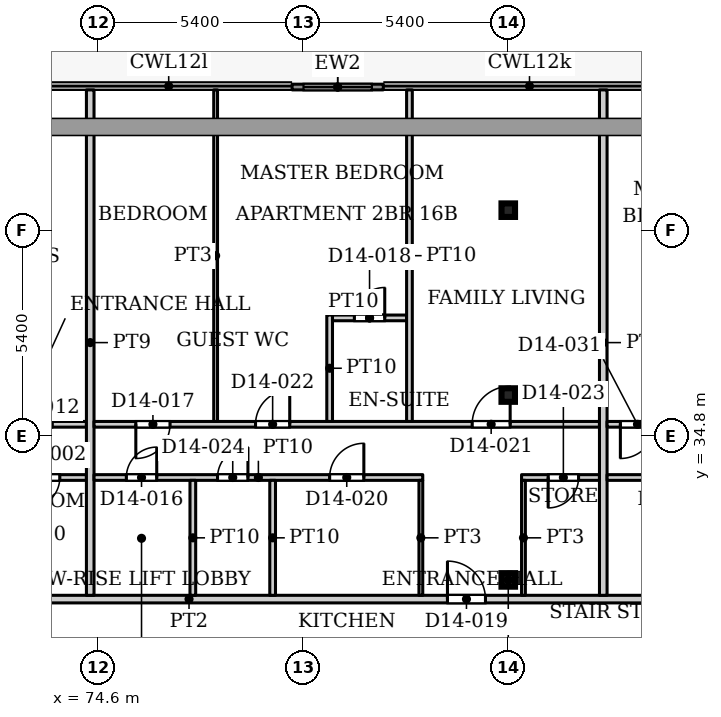
"""IFC4 building model, lengths in metres.
Left out: names, types, materials, properties, quantities, classifications, styles, units other than length and angle.
Written with IfcOpenShell. Run it as: python <this file> out.ifc"""

import sys

from ifc_helpers import new_model, si_unit, direction, frame, frame_2d, origin, origin_2d, place, context, subcontext, project, spatial, rectangle, hollow_rectangle, extrude, source, transform, mapped, element, fill, save


model = new_model("IFC4")
c1 = context("Model", 3, precision=1e-05, world=origin(), true_north=direction((0.0, 1.0)))
c2 = subcontext(c1, "Body", "Model", "MODEL_VIEW")
j1 = project(units=[si_unit("LENGTHUNIT", "METRE"), si_unit("PLANEANGLEUNIT", "RADIAN")], contexts=[c1])
p1 = place(None, origin())
s1 = spatial("IfcSite", under=j1, at=p1, CompositionType="ELEMENT")
p2 = place(p1, origin())
s2 = spatial("IfcBuilding", under=s1, at=p2, CompositionType="ELEMENT")
p3 = place(p2, frame((0.0, 0.0, 69.5)))
s3 = spatial("IfcBuildingStorey", under=s2, at=p3, CompositionType="ELEMENT", Elevation=69.5)
for number, where, z_axis, x_axis in (
    (1, (85.4, 31.005, 0.0), (0.0, 0.0, 1.0), (1.0, 0.0, 0.0)),
    (2, (85.4, 35.87, 0.0), (0.0, 0.0, 1.0), (1.0, 0.0, 0.0)),
    (3, (85.4, 40.735, 0.0), (0.0, 0.0, 1.0), (1.0, 0.0, 0.0)),
):
    element("IfcColumn", number, at=place(p3, frame(where, z_axis=z_axis, x_axis=x_axis)), inside=s3, PredefinedType="COLUMN", context=c2, shape_type="SweptSolid", body=[
        extrude(hollow_rectangle(XDim=0.356, YDim=0.356, WallThickness=0.016, InnerFilletRadius=0.016, OuterFilletRadius=0.032, at=origin_2d()), origin(), (0.0, 0.0, 1.0), 3.9),
    ])
p4 = place(p3, frame((79.712, 43.975, 0.0), z_axis=(0.0, 0.0, 1.0), x_axis=(1.0, 0.0, 0.0)))
e4 = element("IfcWall", 4, at=p4, inside=s3, PredefinedType="SOLIDWALL", context=c2, shape_type="SweptSolid", body=[
    extrude(rectangle(XDim=2.4, YDim=0.15, at=frame_2d((1.2, 0.0))), origin(), (0.0, 0.0, 1.0), 3.75),
])
p5 = place(p4, frame((0.3, 0.0, 0.0)))
e5 = element("IfcOpeningElement", 5, at=p5, cuts=e4, PredefinedType="OPENING", context=c2, shape_type="SweptSolid", body=[
    extrude(rectangle(XDim=1.8, YDim=2.4, at=frame_2d((0.9, 1.2))), frame((0.0, 0.085, 0.0), z_axis=(0.0, -1.0, 0.0), x_axis=(1.0, 0.0, 0.0)), (0.0, 0.0, 1.0), 0.17),
])
p6 = place(p3, frame((55.9, 30.5, 0.0), z_axis=(0.0, 0.0, 1.0), x_axis=(1.0, 0.0, 0.0)))
e6 = element("IfcWall", 6, at=p6, inside=s3, PredefinedType="PARTITIONING", context=c2, shape_type="SweptSolid", body=[
    extrude(rectangle(XDim=42.2, YDim=0.2, at=frame_2d((21.1, 0.0))), origin(), (0.0, 0.0, 1.0), 3.6),
])
p7 = place(p6, frame((14.7, 0.0, 0.0)))
e7 = element("IfcOpeningElement", 7, at=p7, cuts=e6, PredefinedType="OPENING", context=c2, shape_type="SweptSolid", body=[
    extrude(rectangle(XDim=1.0, YDim=2.1, at=frame_2d((0.5, 1.05))), frame((0.0, 0.11, 0.0), z_axis=(0.0, -1.0, 0.0), x_axis=(1.0, 0.0, 0.0)), (0.0, 0.0, 1.0), 0.22),
])
p8 = place(p6, frame((27.9, 0.0, 0.0)))
e8 = element("IfcOpeningElement", 8, at=p8, cuts=e6, PredefinedType="OPENING", context=c2, shape_type="SweptSolid", body=[
    extrude(rectangle(XDim=1.0, YDim=2.1, at=frame_2d((0.5, 1.05))), frame((0.0, 0.11, 0.0), z_axis=(0.0, -1.0, 0.0), x_axis=(1.0, 0.0, 0.0)), (0.0, 0.0, 1.0), 0.22),
])
p9 = place(p6, frame((39.0, 0.0, 0.0)))
e9 = element("IfcOpeningElement", 9, at=p9, cuts=e6, PredefinedType="OPENING", context=c2, shape_type="SweptSolid", body=[
    extrude(rectangle(XDim=1.0, YDim=2.1, at=frame_2d((0.5, 1.05))), frame((0.0, 0.11, 0.0), z_axis=(0.0, -1.0, 0.0), x_axis=(1.0, 0.0, 0.0)), (0.0, 0.0, 1.0), 0.22),
])
p10 = place(p3, frame((55.9, 35.1, 0.0), z_axis=(0.0, 0.0, 1.0), x_axis=(1.0, 0.0, 0.0)))
e10 = element("IfcWall", 10, at=p10, inside=s3, PredefinedType="PARTITIONING", context=c2, shape_type="SweptSolid", body=[
    extrude(rectangle(XDim=18.4, YDim=0.15, at=frame_2d((9.2, 0.0))), origin(), (0.0, 0.0, 1.0), 3.6),
])
p11 = place(p10, frame((1.25, 0.0, 0.0)))
e11 = element("IfcOpeningElement", 11, at=p11, cuts=e10, PredefinedType="OPENING", context=c2, shape_type="SweptSolid", body=[
    extrude(rectangle(XDim=0.9, YDim=2.1, at=frame_2d((0.45, 1.05))), frame((0.0, 0.085, 0.0), z_axis=(0.0, -1.0, 0.0), x_axis=(1.0, 0.0, 0.0)), (0.0, 0.0, 1.0), 0.17),
])
p12 = place(p10, frame((9.2, 0.0, 0.0)))
e12 = element("IfcOpeningElement", 12, at=p12, cuts=e10, PredefinedType="OPENING", context=c2, shape_type="SweptSolid", body=[
    extrude(rectangle(XDim=0.9, YDim=2.1, at=frame_2d((0.45, 1.05))), frame((0.0, 0.085, 0.0), z_axis=(0.0, -1.0, 0.0), x_axis=(1.0, 0.0, 0.0)), (0.0, 0.0, 1.0), 0.17),
])
p13 = place(p10, frame((12.35, 0.0, 0.0)))
e13 = element("IfcOpeningElement", 13, at=p13, cuts=e10, PredefinedType="OPENING", context=c2, shape_type="SweptSolid", body=[
    extrude(rectangle(XDim=1.0, YDim=2.1, at=frame_2d((0.5, 1.05))), frame((0.0, 0.085, 0.0), z_axis=(0.0, -1.0, 0.0), x_axis=(1.0, 0.0, 0.0)), (0.0, 0.0, 1.0), 0.17),
])
p14 = place(p10, frame((15.9, 0.0, 0.0)))
e14 = element("IfcOpeningElement", 14, at=p14, cuts=e10, PredefinedType="OPENING", context=c2, shape_type="SweptSolid", body=[
    extrude(rectangle(XDim=1.6, YDim=2.1, at=frame_2d((0.8, 1.05))), frame((0.0, 0.085, 0.0), z_axis=(0.0, -1.0, 0.0), x_axis=(1.0, 0.0, 0.0)), (0.0, 0.0, 1.0), 0.17),
])
p15 = place(p10, frame((4.4, 0.0, 0.0)))
e15 = element("IfcOpeningElement", 15, at=p15, cuts=e10, PredefinedType="OPENING", context=c2, shape_type="SweptSolid", body=[
    extrude(rectangle(XDim=0.9, YDim=2.1, at=frame_2d((0.45, 1.05))), frame((0.0, 0.085, 0.0), z_axis=(0.0, -1.0, 0.0), x_axis=(1.0, 0.0, 0.0)), (0.0, 0.0, 1.0), 0.17),
])
p16 = place(p3, frame((72.075, 33.7, 0.0), z_axis=(0.0, 0.0, 1.0), x_axis=(1.0, 0.0, 0.0)))
e16 = element("IfcWall", 16, at=p16, inside=s3, PredefinedType="PARTITIONING", context=c2, shape_type="SweptSolid", body=[
    extrude(rectangle(XDim=2.225, YDim=0.15, at=frame_2d((1.113, 0.0))), origin(), (0.0, 0.0, 1.0), 3.6),
])
p17 = place(p16, frame((0.725, 0.0, 0.0)))
e17 = element("IfcOpeningElement", 17, at=p17, cuts=e16, PredefinedType="OPENING", context=c2, shape_type="SweptSolid", body=[
    extrude(rectangle(XDim=0.8, YDim=2.1, at=frame_2d((0.4, 1.05))), frame((0.0, 0.085, 0.0), z_axis=(0.0, -1.0, 0.0), x_axis=(1.0, 0.0, 0.0)), (0.0, 0.0, 1.0), 0.17),
])
p18 = place(p3, frame((74.4, 30.6, 0.0), z_axis=(0.0, 0.0, 1.0), x_axis=(0.0, 1.0, 0.0)))
e18 = element("IfcWall", 18, at=p18, inside=s3, PredefinedType="PARTITIONING", context=c2, shape_type="SweptSolid", body=[
    extrude(rectangle(XDim=13.3, YDim=0.2, at=frame_2d((6.65, 0.0))), origin(), (0.0, 0.0, 1.0), 3.6),
])
p19 = place(p3, frame((74.5, 33.7, 0.0), z_axis=(0.0, 0.0, 1.0), x_axis=(1.0, 0.0, 0.0)))
e19 = element("IfcWall", 19, at=p19, inside=s3, PredefinedType="PARTITIONING", context=c2, shape_type="SweptSolid", body=[
    extrude(rectangle(XDim=8.65, YDim=0.15, at=frame_2d((4.325, 0.0))), origin(), (0.0, 0.0, 1.0), 3.6),
])
p20 = place(p19, frame((0.85, 0.0, 0.0)))
e20 = element("IfcOpeningElement", 20, at=p20, cuts=e19, PredefinedType="OPENING", context=c2, shape_type="SweptSolid", body=[
    extrude(rectangle(XDim=0.8, YDim=2.1, at=frame_2d((0.4, 1.05))), frame((0.0, 0.085, 0.0), z_axis=(0.0, -1.0, 0.0), x_axis=(1.0, 0.0, 0.0)), (0.0, 0.0, 1.0), 0.17),
])
p21 = place(p19, frame((6.2, 0.0, 0.0)))
e21 = element("IfcOpeningElement", 21, at=p21, cuts=e19, PredefinedType="OPENING", context=c2, shape_type="SweptSolid", body=[
    extrude(rectangle(XDim=0.9, YDim=2.1, at=frame_2d((0.45, 1.05))), frame((0.0, 0.085, 0.0), z_axis=(0.0, -1.0, 0.0), x_axis=(1.0, 0.0, 0.0)), (0.0, 0.0, 1.0), 0.17),
])
p22 = place(p19, frame((3.25, 0.0, 0.0)))
e22 = element("IfcOpeningElement", 22, at=p22, cuts=e19, PredefinedType="OPENING", context=c2, shape_type="SweptSolid", body=[
    extrude(rectangle(XDim=0.8, YDim=2.1, at=frame_2d((0.4, 1.05))), frame((0.0, 0.085, 0.0), z_axis=(0.0, -1.0, 0.0), x_axis=(1.0, 0.0, 0.0)), (0.0, 0.0, 1.0), 0.17),
])
p23 = place(p3, frame((74.5, 35.1, 0.0), z_axis=(0.0, 0.0, 1.0), x_axis=(1.0, 0.0, 0.0)))
e23 = element("IfcWall", 23, at=p23, inside=s3, PredefinedType="PARTITIONING", context=c2, shape_type="SweptSolid", body=[
    extrude(rectangle(XDim=13.3, YDim=0.15, at=frame_2d((6.65, 0.0))), origin(), (0.0, 0.0, 1.0), 3.6),
])
p24 = place(p23, frame((1.1, 0.0, 0.0)))
e24 = element("IfcOpeningElement", 24, at=p24, cuts=e23, PredefinedType="OPENING", context=c2, shape_type="SweptSolid", body=[
    extrude(rectangle(XDim=0.9, YDim=2.1, at=frame_2d((0.45, 1.05))), frame((0.0, 0.085, 0.0), z_axis=(0.0, -1.0, 0.0), x_axis=(1.0, 0.0, 0.0)), (0.0, 0.0, 1.0), 0.17),
])
p25 = place(p23, frame((9.95, 0.0, 0.0)))
e25 = element("IfcOpeningElement", 25, at=p25, cuts=e23, PredefinedType="OPENING", context=c2, shape_type="SweptSolid", body=[
    extrude(rectangle(XDim=1.0, YDim=2.1, at=frame_2d((0.5, 1.05))), frame((0.0, 0.085, 0.0), z_axis=(0.0, -1.0, 0.0), x_axis=(1.0, 0.0, 0.0)), (0.0, 0.0, 1.0), 0.17),
])
p26 = place(p23, frame((4.25, 0.0, 0.0)))
e26 = element("IfcOpeningElement", 26, at=p26, cuts=e23, PredefinedType="OPENING", context=c2, shape_type="SweptSolid", body=[
    extrude(rectangle(XDim=0.9, YDim=2.1, at=frame_2d((0.45, 1.05))), frame((0.0, 0.085, 0.0), z_axis=(0.0, -1.0, 0.0), x_axis=(1.0, 0.0, 0.0)), (0.0, 0.0, 1.0), 0.17),
])
p27 = place(p3, frame((77.1, 30.6, 0.0), z_axis=(0.0, 0.0, 1.0), x_axis=(0.0, 1.0, 0.0)))
e27 = element("IfcWall", 27, at=p27, inside=s3, PredefinedType="PARTITIONING", context=c2, shape_type="SweptSolid", body=[
    extrude(rectangle(XDim=3.025, YDim=0.15, at=frame_2d((1.512, 0.0))), origin(), (0.0, 0.0, 1.0), 3.6),
])
p28 = place(p3, frame((77.7, 35.175, 0.0), z_axis=(0.0, 0.0, 1.0), x_axis=(0.0, 1.0, 0.0)))
e28 = element("IfcWall", 28, at=p28, inside=s3, PredefinedType="PARTITIONING", context=c2, shape_type="SweptSolid", body=[
    extrude(rectangle(XDim=8.725, YDim=0.1, at=frame_2d((4.362, 0.0))), origin(), (0.0, 0.0, 1.0), 3.6),
])
p29 = place(p3, frame((79.2, 30.6, 0.0), z_axis=(0.0, 0.0, 1.0), x_axis=(0.0, 1.0, 0.0)))
e29 = element("IfcWall", 29, at=p29, inside=s3, PredefinedType="PARTITIONING", context=c2, shape_type="SweptSolid", body=[
    extrude(rectangle(XDim=3.025, YDim=0.15, at=frame_2d((1.512, 0.0))), origin(), (0.0, 0.0, 1.0), 3.6),
])
p30 = place(p3, frame((80.7, 35.175, 0.0), z_axis=(0.0, 0.0, 1.0), x_axis=(0.0, 1.0, 0.0)))
e30 = element("IfcWall", 30, at=p30, inside=s3, PredefinedType="PARTITIONING", context=c2, shape_type="SweptSolid", body=[
    extrude(rectangle(XDim=2.8, YDim=0.15, at=frame_2d((1.4, 0.0))), origin(), (0.0, 0.0, 1.0), 3.6),
])
p31 = place(p3, frame((80.775, 37.9, 0.0), z_axis=(0.0, 0.0, 1.0), x_axis=(1.0, 0.0, 0.0)))
e31 = element("IfcWall", 31, at=p31, inside=s3, PredefinedType="PARTITIONING", context=c2, shape_type="SweptSolid", body=[
    extrude(rectangle(XDim=1.95, YDim=0.15, at=frame_2d((0.975, 0.0))), origin(), (0.0, 0.0, 1.0), 3.6),
])
p32 = place(p31, frame((0.575, 0.0, 0.0)))
e32 = element("IfcOpeningElement", 32, at=p32, cuts=e31, PredefinedType="OPENING", context=c2, shape_type="SweptSolid", body=[
    extrude(rectangle(XDim=0.8, YDim=2.1, at=frame_2d((0.4, 1.05))), frame((0.0, 0.085, 0.0), z_axis=(0.0, -1.0, 0.0), x_axis=(1.0, 0.0, 0.0)), (0.0, 0.0, 1.0), 0.17),
])
p33 = place(p3, frame((82.8, 35.175, 0.0), z_axis=(0.0, 0.0, 1.0), x_axis=(0.0, 1.0, 0.0)))
e33 = element("IfcWall", 33, at=p33, inside=s3, PredefinedType="PARTITIONING", context=c2, shape_type="SweptSolid", body=[
    extrude(rectangle(XDim=8.725, YDim=0.15, at=frame_2d((4.362, 0.0))), origin(), (0.0, 0.0, 1.0), 3.6),
])
p34 = place(p3, frame((83.1, 30.6, 0.0), z_axis=(0.0, 0.0, 1.0), x_axis=(0.0, 1.0, 0.0)))
e34 = element("IfcWall", 34, at=p34, inside=s3, PredefinedType="PARTITIONING", context=c2, shape_type="SweptSolid", body=[
    extrude(rectangle(XDim=3.025, YDim=0.1, at=frame_2d((1.512, 0.0))), origin(), (0.0, 0.0, 1.0), 3.6),
])
p35 = place(p3, frame((85.75, 33.7, 0.0), z_axis=(0.0, 0.0, 1.0), x_axis=(1.0, 0.0, 0.0)))
e35 = element("IfcWall", 35, at=p35, inside=s3, PredefinedType="PARTITIONING", context=c2, shape_type="SweptSolid", body=[
    extrude(rectangle(XDim=2.05, YDim=0.15, at=frame_2d((1.025, 0.0))), origin(), (0.0, 0.0, 1.0), 3.6),
])
p36 = place(p35, frame((0.7, 0.0, 0.0)))
e36 = element("IfcOpeningElement", 36, at=p36, cuts=e35, PredefinedType="OPENING", context=c2, shape_type="SweptSolid", body=[
    extrude(rectangle(XDim=0.8, YDim=2.1, at=frame_2d((0.4, 1.05))), frame((0.0, 0.085, 0.0), z_axis=(0.0, -1.0, 0.0), x_axis=(1.0, 0.0, 0.0)), (0.0, 0.0, 1.0), 0.17),
])
p37 = place(p3, frame((85.8, 30.6, 0.0), z_axis=(0.0, 0.0, 1.0), x_axis=(0.0, 1.0, 0.0)))
e37 = element("IfcWall", 37, at=p37, inside=s3, PredefinedType="PARTITIONING", context=c2, shape_type="SweptSolid", body=[
    extrude(rectangle(XDim=3.025, YDim=0.1, at=frame_2d((1.512, 0.0))), origin(), (0.0, 0.0, 1.0), 3.6),
])
p38 = place(p3, frame((87.9, 30.6, 0.0), z_axis=(0.0, 0.0, 1.0), x_axis=(0.0, 1.0, 0.0)))
e38 = element("IfcWall", 38, at=p38, inside=s3, PredefinedType="PARTITIONING", context=c2, shape_type="SweptSolid", body=[
    extrude(rectangle(XDim=13.3, YDim=0.2, at=frame_2d((6.65, 0.0))), origin(), (0.0, 0.0, 1.0), 3.6),
])
p39 = place(p3, frame((88.0, 33.7, 0.0), z_axis=(0.0, 0.0, 1.0), x_axis=(1.0, 0.0, 0.0)))
e39 = element("IfcWall", 39, at=p39, inside=s3, PredefinedType="PARTITIONING", context=c2, shape_type="SweptSolid", body=[
    extrude(rectangle(XDim=6.275, YDim=0.15, at=frame_2d((3.137, 0.0))), origin(), (0.0, 0.0, 1.0), 3.6),
])
p40 = place(p39, frame((1.45, 0.0, 0.0)))
e40 = element("IfcOpeningElement", 40, at=p40, cuts=e39, PredefinedType="OPENING", context=c2, shape_type="SweptSolid", body=[
    extrude(rectangle(XDim=0.9, YDim=2.1, at=frame_2d((0.45, 1.05))), frame((0.0, 0.085, 0.0), z_axis=(0.0, -1.0, 0.0), x_axis=(1.0, 0.0, 0.0)), (0.0, 0.0, 1.0), 0.17),
])
p41 = place(p39, frame((4.75, 0.0, 0.0)))
e41 = element("IfcOpeningElement", 41, at=p41, cuts=e39, PredefinedType="OPENING", context=c2, shape_type="SweptSolid", body=[
    extrude(rectangle(XDim=0.8, YDim=2.1, at=frame_2d((0.4, 1.05))), frame((0.0, 0.085, 0.0), z_axis=(0.0, -1.0, 0.0), x_axis=(1.0, 0.0, 0.0)), (0.0, 0.0, 1.0), 0.17),
])
p42 = place(p3, frame((88.0, 35.1, 0.0), z_axis=(0.0, 0.0, 1.0), x_axis=(1.0, 0.0, 0.0)))
e42 = element("IfcWall", 42, at=p42, inside=s3, PredefinedType="PARTITIONING", context=c2, shape_type="SweptSolid", body=[
    extrude(rectangle(XDim=11.9, YDim=0.15, at=frame_2d((5.95, 0.0))), origin(), (0.0, 0.0, 1.0), 3.6),
])
p43 = place(p42, frame((9.65, 0.0, 0.0)))
e43 = element("IfcOpeningElement", 43, at=p43, cuts=e42, PredefinedType="OPENING", context=c2, shape_type="SweptSolid", body=[
    extrude(rectangle(XDim=0.9, YDim=2.1, at=frame_2d((0.45, 1.05))), frame((0.0, 0.085, 0.0), z_axis=(0.0, -1.0, 0.0), x_axis=(1.0, 0.0, 0.0)), (0.0, 0.0, 1.0), 0.17),
])
p44 = place(p42, frame((5.55, 0.0, 0.0)))
e44 = element("IfcOpeningElement", 44, at=p44, cuts=e42, PredefinedType="OPENING", context=c2, shape_type="SweptSolid", body=[
    extrude(rectangle(XDim=1.0, YDim=2.1, at=frame_2d((0.5, 1.05))), frame((0.0, 0.085, 0.0), z_axis=(0.0, -1.0, 0.0), x_axis=(1.0, 0.0, 0.0)), (0.0, 0.0, 1.0), 0.17),
])
p45 = place(p42, frame((0.35, 0.0, 0.0)))
e45 = element("IfcOpeningElement", 45, at=p45, cuts=e42, PredefinedType="OPENING", context=c2, shape_type="SweptSolid", body=[
    extrude(rectangle(XDim=0.9, YDim=2.1, at=frame_2d((0.45, 1.05))), frame((0.0, 0.085, 0.0), z_axis=(0.0, -1.0, 0.0), x_axis=(1.0, 0.0, 0.0)), (0.0, 0.0, 1.0), 0.17),
])
m1 = source(origin(), c2, "Body", "SweptSolid", [
    extrude(rectangle(XDim=1.8, YDim=2.4, at=frame_2d((0.9, 1.2))), frame((0.0, 0.025, 0.0), z_axis=(0.0, -1.0, 0.0), x_axis=(1.0, 0.0, 0.0)), (0.0, 0.0, 1.0), 0.05),
])
p46 = place(p5, origin())
e46 = element("IfcDoor", 46, at=p46, inside=s3, OperationType="SLIDING_TO_LEFT", PredefinedType="DOOR", context=c2, shape_type="MappedRepresentation", body=[
    mapped(m1, transform((0.0, 0.0, 0.0), x_axis=(1.0, 0.0, 0.0), y_axis=(0.0, 1.0, 0.0), z_axis=(0.0, 0.0, 1.0), scale=1.0)),
])
fill(e5, e46)
m2 = source(origin(), c2, "Body", "SweptSolid", [
    extrude(rectangle(XDim=0.8, YDim=2.1, at=frame_2d((0.4, 1.05))), frame((0.0, 0.025, 0.0), z_axis=(0.0, -1.0, 0.0), x_axis=(1.0, 0.0, 0.0)), (0.0, 0.0, 1.0), 0.05),
])
p47 = place(p17, origin())
e47 = element("IfcDoor", 47, at=p47, inside=s3, OperationType="SINGLE_SWING_RIGHT", PredefinedType="DOOR", context=c2, shape_type="MappedRepresentation", body=[
    mapped(m2, transform((0.0, 0.0, 0.0), x_axis=(1.0, 0.0, 0.0), y_axis=(0.0, 1.0, 0.0), z_axis=(0.0, 0.0, 1.0), scale=1.0)),
])
fill(e17, e47)
p48 = place(p20, origin())
e48 = element("IfcDoor", 48, at=p48, inside=s3, OperationType="SINGLE_SWING_LEFT", PredefinedType="DOOR", context=c2, shape_type="MappedRepresentation", body=[
    mapped(m2, transform((0.0, 0.0, 0.0), x_axis=(1.0, 0.0, 0.0), y_axis=(0.0, 1.0, 0.0), z_axis=(0.0, 0.0, 1.0), scale=1.0)),
])
fill(e20, e48)
m3 = source(origin(), c2, "Body", "SweptSolid", [
    extrude(rectangle(XDim=0.9, YDim=2.1, at=frame_2d((0.45, 1.05))), frame((0.0, 0.025, 0.0), z_axis=(0.0, -1.0, 0.0), x_axis=(1.0, 0.0, 0.0)), (0.0, 0.0, 1.0), 0.05),
])
p49 = place(p24, origin())
e49 = element("IfcDoor", 49, at=p49, inside=s3, OperationType="SINGLE_SWING_RIGHT", PredefinedType="DOOR", context=c2, shape_type="MappedRepresentation", body=[
    mapped(m3, transform((0.0, 0.0, 0.0), x_axis=(1.0, 0.0, 0.0), y_axis=(0.0, 1.0, 0.0), z_axis=(0.0, 0.0, 1.0), scale=1.0)),
])
fill(e24, e49)
p50 = place(p32, origin())
e50 = element("IfcDoor", 50, at=p50, inside=s3, OperationType="SINGLE_SWING_LEFT", PredefinedType="DOOR", context=c2, shape_type="MappedRepresentation", body=[
    mapped(m2, transform((0.0, 0.0, 0.0), x_axis=(1.0, 0.0, 0.0), y_axis=(0.0, 1.0, 0.0), z_axis=(0.0, 0.0, 1.0), scale=1.0)),
])
fill(e32, e50)
m4 = source(origin(), c2, "Body", "SweptSolid", [
    extrude(rectangle(XDim=1.0, YDim=2.1, at=frame_2d((0.5, 1.05))), frame((0.0, 0.025, 0.0), z_axis=(0.0, -1.0, 0.0), x_axis=(1.0, 0.0, 0.0)), (0.0, 0.0, 1.0), 0.05),
])
p51 = place(p8, origin())
e51 = element("IfcDoor", 51, at=p51, inside=s3, OperationType="SINGLE_SWING_LEFT", PredefinedType="DOOR", context=c2, shape_type="MappedRepresentation", body=[
    mapped(m4, transform((0.0, 0.0, 0.0), x_axis=(1.0, 0.0, 0.0), y_axis=(0.0, 1.0, 0.0), z_axis=(0.0, 0.0, 1.0), scale=1.0)),
])
fill(e8, e51)
p52 = place(p21, origin())
e52 = element("IfcDoor", 52, at=p52, inside=s3, OperationType="SINGLE_SWING_LEFT", PredefinedType="DOOR", context=c2, shape_type="MappedRepresentation", body=[
    mapped(m3, transform((0.0, 0.0, 0.0), x_axis=(1.0, 0.0, 0.0), y_axis=(0.0, 1.0, 0.0), z_axis=(0.0, 0.0, 1.0), scale=1.0)),
])
fill(e21, e52)
m5 = source(origin(), c2, "Body", "SweptSolid", [
    extrude(rectangle(XDim=1.0, YDim=2.1, at=frame_2d((0.5, 1.05))), frame((0.0, 0.025, 0.0), z_axis=(0.0, -1.0, 0.0), x_axis=(1.0, 0.0, 0.0)), (0.0, 0.0, 1.0), 0.05),
])
p53 = place(p25, origin())
e53 = element("IfcDoor", 53, at=p53, inside=s3, OperationType="SINGLE_SWING_LEFT", PredefinedType="DOOR", context=c2, shape_type="MappedRepresentation", body=[
    mapped(m5, transform((0.0, 0.0, 0.0), x_axis=(1.0, 0.0, 0.0), y_axis=(0.0, 1.0, 0.0), z_axis=(0.0, 0.0, 1.0), scale=1.0)),
])
fill(e25, e53)
p54 = place(p26, origin())
e54 = element("IfcDoor", 54, at=p54, inside=s3, OperationType="SINGLE_SWING_LEFT", PredefinedType="DOOR", context=c2, shape_type="MappedRepresentation", body=[
    mapped(m3, transform((0.0, 0.0, 0.0), x_axis=(1.0, 0.0, 0.0), y_axis=(0.0, 1.0, 0.0), z_axis=(0.0, 0.0, 1.0), scale=1.0)),
])
fill(e26, e54)
p55 = place(p36, origin())
e55 = element("IfcDoor", 55, at=p55, inside=s3, OperationType="SINGLE_SWING_RIGHT", PredefinedType="DOOR", context=c2, shape_type="MappedRepresentation", body=[
    mapped(m2, transform((0.0, 0.0, 0.0), x_axis=(1.0, 0.0, 0.0), y_axis=(0.0, 1.0, 0.0), z_axis=(0.0, 0.0, 1.0), scale=1.0)),
])
fill(e36, e55)
p56 = place(p22, origin())
e56 = element("IfcDoor", 56, at=p56, inside=s3, OperationType="SINGLE_SWING_LEFT", PredefinedType="DOOR", context=c2, shape_type="MappedRepresentation", body=[
    mapped(m2, transform((0.0, 0.0, 0.0), x_axis=(1.0, 0.0, 0.0), y_axis=(0.0, 1.0, 0.0), z_axis=(0.0, 0.0, 1.0), scale=1.0)),
])
fill(e22, e56)
p57 = place(p45, origin())
e57 = element("IfcDoor", 57, at=p57, inside=s3, OperationType="SINGLE_SWING_RIGHT", PredefinedType="DOOR", context=c2, shape_type="MappedRepresentation", body=[
    mapped(m3, transform((0.0, 0.0, 0.0), x_axis=(1.0, 0.0, 0.0), y_axis=(0.0, 1.0, 0.0), z_axis=(0.0, 0.0, 1.0), scale=1.0)),
])
fill(e45, e57)
save(model, sys.argv[1])
